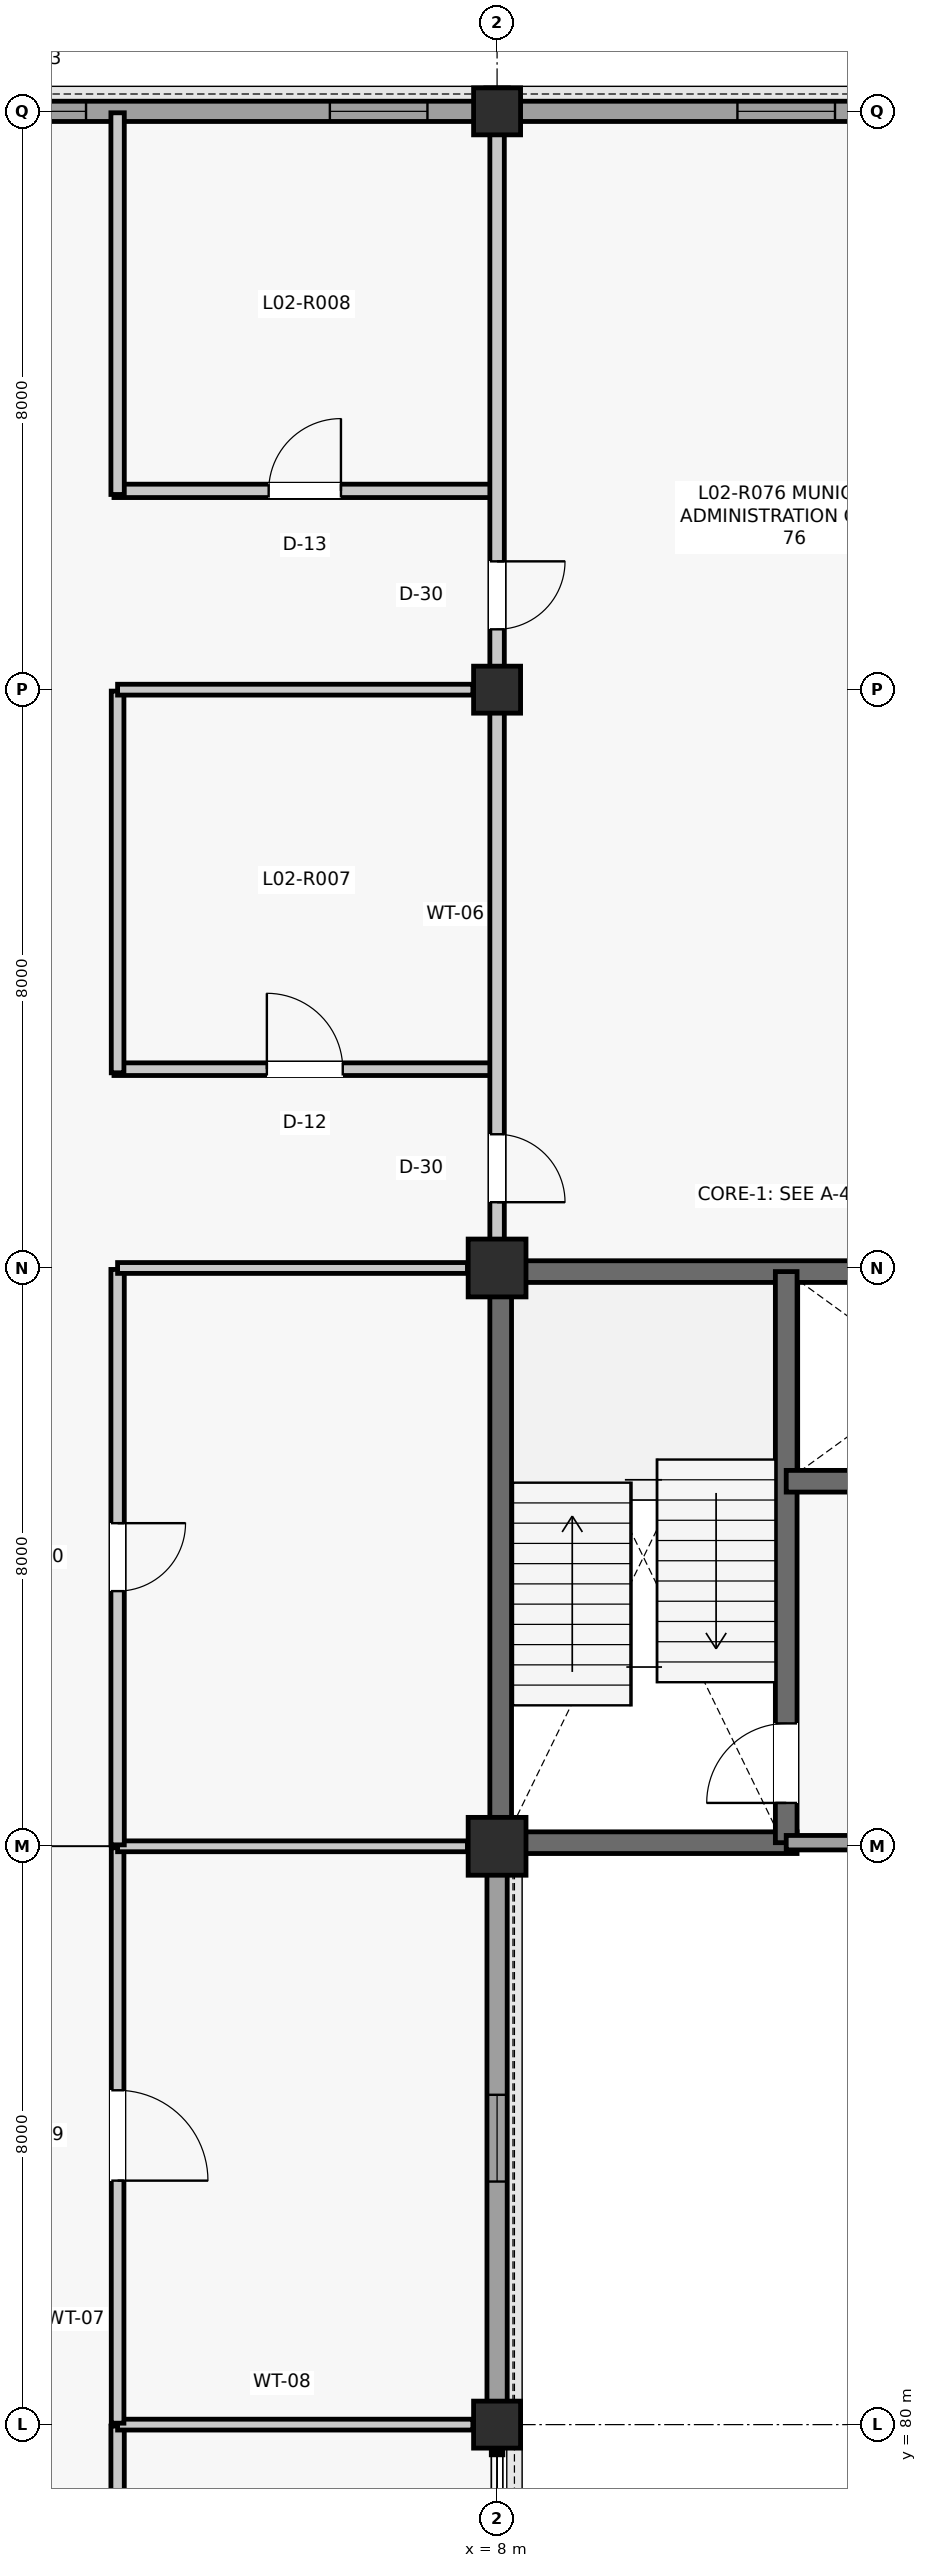
"""IFC4 building model, lengths in metres.
Left out: names, types, materials, properties, quantities, classifications, styles, units other than length and angle.
Written with IfcOpenShell. Run it as: python <this file> out.ifc"""

import sys

from ifc_helpers import new_model, si_unit, direction, frame, frame_2d, origin, origin_2d, place, context, subcontext, project, spatial, rectangle, extrude, element, fill, save


model = new_model("IFC4")
c1 = context("Model", 3, precision=1e-05, world=origin(), true_north=direction((0.0, 1.0)))
c2 = subcontext(c1, "Body", "Model", "MODEL_VIEW")
j1 = project(units=[si_unit("LENGTHUNIT", "METRE"), si_unit("PLANEANGLEUNIT", "RADIAN")], contexts=[c1])
p1 = place(None, origin())
s1 = spatial("IfcSite", under=j1, at=p1, CompositionType="ELEMENT")
p2 = place(p1, origin())
s2 = spatial("IfcBuilding", under=s1, at=p2, CompositionType="ELEMENT")
p3 = place(p2, frame((0.0, 0.0, 9.9)))
s3 = spatial("IfcBuildingStorey", under=s2, at=p3, CompositionType="ELEMENT", Elevation=9.9)
p4 = place(p3, frame((8.0, 80.0, 0.0), z_axis=(0.0, 0.0, 1.0), x_axis=(1.0, 0.0, 0.0)))
e1 = element("IfcColumn", 1, at=p4, inside=s3, PredefinedType="COLUMN", context=c2, shape_type="SweptSolid", body=[
    extrude(rectangle(XDim=0.65, YDim=0.65, at=origin_2d()), origin(), (0.0, 0.0, 1.0), 3.96),
])
for number, where, z_axis, x_axis in (
    (2, (8.0, 88.0, 0.0), (0.0, 0.0, 1.0), (1.0, 0.0, 0.0)),
    (3, (8.0, 96.0, 0.0), (0.0, 0.0, 1.0), (1.0, 0.0, 0.0)),
):
    element("IfcColumn", number, at=place(p3, frame(where, z_axis=z_axis, x_axis=x_axis)), inside=s3, PredefinedType="COLUMN", context=c2, shape_type="SweptSolid", body=[
        extrude(rectangle(XDim=0.8, YDim=0.8, at=origin_2d()), origin(), (0.0, 0.0, 1.0), 3.96),
    ])
for number, where, z_axis, x_axis in (
    (4, (8.0, 104.0, 0.0), (0.0, 0.0, 1.0), (1.0, 0.0, 0.0)),
    (5, (8.0, 112.0, 0.0), (0.0, 0.0, 1.0), (1.0, 0.0, 0.0)),
):
    element("IfcColumn", number, at=place(p3, frame(where, z_axis=z_axis, x_axis=x_axis)), inside=s3, PredefinedType="COLUMN", context=c2, shape_type="SweptSolid", body=[
        extrude(rectangle(XDim=0.65, YDim=0.65, at=origin_2d()), origin(), (0.0, 0.0, 1.0), 3.96),
    ])
p5 = place(p3, frame((8.0, 80.31, 0.0), z_axis=(0.0, 0.0, 1.0), x_axis=(0.0, 1.0, 0.0)))
e6 = element("IfcWall", 6, at=p5, inside=s3, PredefinedType="SOLIDWALL", context=c2, shape_type="SweptSolid", body=[
    extrude(rectangle(XDim=7.305, YDim=0.28, at=frame_2d((3.652, 0.0))), origin(), (0.0, 0.0, 1.0), 3.344),
])
p6 = place(p5, frame((3.052, 0.0, 0.9)))
e7 = element("IfcOpeningElement", 7, at=p6, cuts=e6, PredefinedType="OPENING", context=c2, shape_type="SweptSolid", body=[
    extrude(rectangle(XDim=1.2, YDim=1.8, at=frame_2d((0.6, 0.9))), frame((0.0, 0.15, 0.0), z_axis=(0.0, -1.0, 0.0), x_axis=(1.0, 0.0, 0.0)), (0.0, 0.0, 1.0), 0.3),
])
p7 = place(p3, frame((0.31, 112.0, 0.0), z_axis=(0.0, 0.0, 1.0), x_axis=(1.0, 0.0, 0.0)))
e8 = element("IfcWall", 8, at=p7, inside=s3, PredefinedType="SOLIDWALL", context=c2, shape_type="SweptSolid", body=[
    extrude(rectangle(XDim=7.38, YDim=0.28, at=frame_2d((3.69, 0.0))), origin(), (0.0, 0.0, 1.0), 3.28),
])
p8 = place(p7, frame((0.653, 0.0, 0.95)))
e9 = element("IfcOpeningElement", 9, at=p8, cuts=e8, PredefinedType="OPENING", context=c2, shape_type="SweptSolid", body=[
    extrude(rectangle(XDim=1.35, YDim=1.9, at=frame_2d((0.675, 0.95))), frame((0.0, 0.15, 0.0), z_axis=(0.0, -1.0, 0.0), x_axis=(1.0, 0.0, 0.0)), (0.0, 0.0, 1.0), 0.3),
])
p9 = place(p7, frame((5.377, 0.0, 0.95)))
e10 = element("IfcOpeningElement", 10, at=p9, cuts=e8, PredefinedType="OPENING", context=c2, shape_type="SweptSolid", body=[
    extrude(rectangle(XDim=1.35, YDim=1.9, at=frame_2d((0.675, 0.95))), frame((0.0, 0.15, 0.0), z_axis=(0.0, -1.0, 0.0), x_axis=(1.0, 0.0, 0.0)), (0.0, 0.0, 1.0), 0.3),
])
p10 = place(p3, frame((8.31, 112.0, 0.0), z_axis=(0.0, 0.0, 1.0), x_axis=(1.0, 0.0, 0.0)))
e11 = element("IfcWall", 11, at=p10, inside=s3, PredefinedType="SOLIDWALL", context=c2, shape_type="SweptSolid", body=[
    extrude(rectangle(XDim=7.38, YDim=0.28, at=frame_2d((3.69, 0.0))), origin(), (0.0, 0.0, 1.0), 3.344),
])
p11 = place(p10, frame((3.015, 0.0, 0.9)))
e12 = element("IfcOpeningElement", 12, at=p11, cuts=e11, PredefinedType="OPENING", context=c2, shape_type="SweptSolid", body=[
    extrude(rectangle(XDim=1.35, YDim=1.9, at=frame_2d((0.675, 0.95))), frame((0.0, 0.15, 0.0), z_axis=(0.0, -1.0, 0.0), x_axis=(1.0, 0.0, 0.0)), (0.0, 0.0, 1.0), 0.3),
])
for number, where, z_axis, x_axis in (
    (13, (8.05, 88.29, 0.0), (0.0, 0.0, 1.0), (0.0, 1.0, 0.0)),
    (14, (8.29, 95.95, 0.0), (0.0, 0.0, 1.0), (1.0, 0.0, 0.0)),
):
    element("IfcWall", number, at=place(p3, frame(where, z_axis=z_axis, x_axis=x_axis)), inside=s3, PredefinedType="SHEAR", context=c2, shape_type="SweptSolid", body=[
        extrude(rectangle(XDim=7.42, YDim=0.3, at=frame_2d((3.71, 0.0))), origin(), (0.0, 0.0, 1.0), 3.705),
    ])
p12 = place(p3, frame((8.29, 88.05, 0.0), z_axis=(0.0, 0.0, 1.0), x_axis=(1.0, 0.0, 0.0)))
e15 = element("IfcWall", 15, at=p12, inside=s3, PredefinedType="SHEAR", context=c2, shape_type="SweptSolid", body=[
    extrude(rectangle(XDim=3.86, YDim=0.3, at=frame_2d((1.93, 0.0))), origin(), (0.0, 0.0, 1.0), 3.705),
])
p13 = place(p3, frame((12.0, 88.05, 0.0), z_axis=(0.0, 0.0, 1.0), x_axis=(0.0, 1.0, 0.0)))
e16 = element("IfcWall", 16, at=p13, inside=s3, PredefinedType="SHEAR", context=c2, shape_type="SweptSolid", body=[
    extrude(rectangle(XDim=7.9, YDim=0.3, at=frame_2d((3.95, 0.0))), origin(), (0.0, 0.0, 1.0), 3.705),
])
p14 = place(p13, frame((0.55, 0.0, 0.0)))
e17 = element("IfcOpeningElement", 17, at=p14, cuts=e16, PredefinedType="OPENING", context=c2, shape_type="SweptSolid", body=[
    extrude(rectangle(XDim=1.1, YDim=2.15, at=frame_2d((0.55, 1.075))), frame((0.0, 0.16, 0.0), z_axis=(0.0, -1.0, 0.0), x_axis=(1.0, 0.0, 0.0)), (0.0, 0.0, 1.0), 0.32),
])
p15 = place(p3, frame((12.0, 93.05, 0.0), z_axis=(0.0, 0.0, 1.0), x_axis=(1.0, 0.0, 0.0)))
e18 = element("IfcWall", 18, at=p15, inside=s3, PredefinedType="SHEAR", context=c2, shape_type="SweptSolid", body=[
    extrude(rectangle(XDim=3.95, YDim=0.3, at=frame_2d((1.975, 0.0))), origin(), (0.0, 0.0, 1.0), 3.705),
])
p16 = place(p15, frame((1.375, 0.0, 0.0)))
e19 = element("IfcOpeningElement", 19, at=p16, cuts=e18, PredefinedType="OPENING", context=c2, shape_type="SweptSolid", body=[
    extrude(rectangle(XDim=1.2, YDim=2.2, at=frame_2d((0.6, 1.1))), frame((0.0, 0.16, 0.0), z_axis=(0.0, -1.0, 0.0), x_axis=(1.0, 0.0, 0.0)), (0.0, 0.0, 1.0), 0.32),
])
p17 = place(p3, frame((12.0, 88.05, 0.0), z_axis=(0.0, 0.0, 1.0), x_axis=(1.0, 0.0, 0.0)))
e20 = element("IfcWall", 20, at=p17, inside=s3, PredefinedType="PARTITIONING", context=c2, shape_type="SweptSolid", body=[
    extrude(rectangle(XDim=3.61, YDim=0.2, at=frame_2d((1.805, 0.0))), origin(), (0.0, 0.0, 1.0), 3.277),
])
p18 = place(p3, frame((2.75, 72.02, 0.0), z_axis=(0.0, 0.0, 1.0), x_axis=(0.0, 1.0, 0.0)))
e21 = element("IfcWall", 21, at=p18, inside=s3, PredefinedType="PARTITIONING", context=c2, shape_type="SweptSolid", body=[
    extrude(rectangle(XDim=7.96, YDim=0.185, at=frame_2d((3.98, 0.0))), origin(), (0.0, 0.0, 1.0), 3.141),
])
p19 = place(p18, frame((3.42, 0.0, 0.0)))
e22 = element("IfcOpeningElement", 22, at=p19, cuts=e21, PredefinedType="OPENING", context=c2, shape_type="SweptSolid", body=[
    extrude(rectangle(XDim=1.12, YDim=2.22, at=frame_2d((0.56, 1.11))), frame((0.0, 0.103, 0.0), z_axis=(0.0, -1.0, 0.0), x_axis=(1.0, 0.0, 0.0)), (0.0, 0.0, 1.0), 0.205),
])
p20 = place(p3, frame((2.75, 80.0, 0.0), z_axis=(0.0, 0.0, 1.0), x_axis=(1.0, 0.0, 0.0)))
e23 = element("IfcWall", 23, at=p20, inside=s3, PredefinedType="PARTITIONING", context=c2, shape_type="SweptSolid", body=[
    extrude(rectangle(XDim=4.915, YDim=0.15, at=frame_2d((2.458, 0.0))), origin(), (0.0, 0.0, 1.0), 3.141),
])
p21 = place(p3, frame((2.75, 80.02, 0.0), z_axis=(0.0, 0.0, 1.0), x_axis=(0.0, 1.0, 0.0)))
e24 = element("IfcWall", 24, at=p21, inside=s3, PredefinedType="PARTITIONING", context=c2, shape_type="SweptSolid", body=[
    extrude(rectangle(XDim=7.96, YDim=0.175, at=frame_2d((3.98, 0.0))), origin(), (0.0, 0.0, 1.0), 3.141),
])
p22 = place(p21, frame((3.355, 0.0, 0.0)))
e25 = element("IfcOpeningElement", 25, at=p22, cuts=e24, PredefinedType="OPENING", context=c2, shape_type="SweptSolid", body=[
    extrude(rectangle(XDim=1.25, YDim=2.18, at=frame_2d((0.625, 1.09))), frame((0.0, 0.097, 0.0), z_axis=(0.0, -1.0, 0.0), x_axis=(1.0, 0.0, 0.0)), (0.0, 0.0, 1.0), 0.195),
])
p23 = place(p3, frame((2.75, 88.0, 0.0), z_axis=(0.0, 0.0, 1.0), x_axis=(1.0, 0.0, 0.0)))
e26 = element("IfcWall", 26, at=p23, inside=s3, PredefinedType="PARTITIONING", context=c2, shape_type="SweptSolid", body=[
    extrude(rectangle(XDim=4.84, YDim=0.15, at=frame_2d((2.42, 0.0))), origin(), (0.0, 0.0, 1.0), 3.151),
])
p24 = place(p3, frame((2.75, 88.02, 0.0), z_axis=(0.0, 0.0, 1.0), x_axis=(0.0, 1.0, 0.0)))
e27 = element("IfcWall", 27, at=p24, inside=s3, PredefinedType="PARTITIONING", context=c2, shape_type="SweptSolid", body=[
    extrude(rectangle(XDim=7.96, YDim=0.185, at=frame_2d((3.98, 0.0))), origin(), (0.0, 0.0, 1.0), 3.082),
])
p25 = place(p24, frame((3.51, 0.0, 0.0)))
e28 = element("IfcOpeningElement", 28, at=p25, cuts=e27, PredefinedType="OPENING", context=c2, shape_type="SweptSolid", body=[
    extrude(rectangle(XDim=0.94, YDim=2.12, at=frame_2d((0.47, 1.06))), frame((0.0, 0.103, 0.0), z_axis=(0.0, -1.0, 0.0), x_axis=(1.0, 0.0, 0.0)), (0.0, 0.0, 1.0), 0.205),
])
p26 = place(p3, frame((2.75, 96.0, 0.0), z_axis=(0.0, 0.0, 1.0), x_axis=(1.0, 0.0, 0.0)))
e29 = element("IfcWall", 29, at=p26, inside=s3, PredefinedType="PARTITIONING", context=c2, shape_type="SweptSolid", body=[
    extrude(rectangle(XDim=4.84, YDim=0.15, at=frame_2d((2.42, 0.0))), origin(), (0.0, 0.0, 1.0), 3.082),
])
p27 = place(p3, frame((2.7, 98.75, 0.0), z_axis=(0.0, 0.0, 1.0), x_axis=(1.0, 0.0, 0.0)))
e30 = element("IfcWall", 30, at=p27, inside=s3, PredefinedType="PARTITIONING", context=c2, shape_type="SweptSolid", body=[
    extrude(rectangle(XDim=5.28, YDim=0.175, at=frame_2d((2.64, 0.0))), origin(), (0.0, 0.0, 1.0), 3.227),
])
p28 = place(p27, frame((2.115, 0.0, 0.0)))
e31 = element("IfcOpeningElement", 31, at=p28, cuts=e30, PredefinedType="OPENING", context=c2, shape_type="SweptSolid", body=[
    extrude(rectangle(XDim=1.05, YDim=2.15, at=frame_2d((0.525, 1.075))), frame((0.0, 0.097, 0.0), z_axis=(0.0, -1.0, 0.0), x_axis=(1.0, 0.0, 0.0)), (0.0, 0.0, 1.0), 0.195),
])
p29 = place(p3, frame((2.75, 98.7, 0.0), z_axis=(0.0, 0.0, 1.0), x_axis=(0.0, 1.0, 0.0)))
e32 = element("IfcWall", 32, at=p29, inside=s3, PredefinedType="PARTITIONING", context=c2, shape_type="SweptSolid", body=[
    extrude(rectangle(XDim=5.28, YDim=0.175, at=frame_2d((2.64, 0.0))), origin(), (0.0, 0.0, 1.0), 3.157),
])
p30 = place(p3, frame((2.75, 104.0, 0.0), z_axis=(0.0, 0.0, 1.0), x_axis=(1.0, 0.0, 0.0)))
e33 = element("IfcWall", 33, at=p30, inside=s3, PredefinedType="PARTITIONING", context=c2, shape_type="SweptSolid", body=[
    extrude(rectangle(XDim=4.915, YDim=0.15, at=frame_2d((2.458, 0.0))), origin(), (0.0, 0.0, 1.0), 3.157),
])
p31 = place(p3, frame((2.7, 106.75, 0.0), z_axis=(0.0, 0.0, 1.0), x_axis=(1.0, 0.0, 0.0)))
e34 = element("IfcWall", 34, at=p31, inside=s3, PredefinedType="PARTITIONING", context=c2, shape_type="SweptSolid", body=[
    extrude(rectangle(XDim=5.28, YDim=0.185, at=frame_2d((2.64, 0.0))), origin(), (0.0, 0.0, 1.0), 3.151),
])
p32 = place(p31, frame((2.14, 0.0, 0.0)))
e35 = element("IfcOpeningElement", 35, at=p32, cuts=e34, PredefinedType="OPENING", context=c2, shape_type="SweptSolid", body=[
    extrude(rectangle(XDim=1.0, YDim=2.15, at=frame_2d((0.5, 1.075))), frame((0.0, 0.103, 0.0), z_axis=(0.0, -1.0, 0.0), x_axis=(1.0, 0.0, 0.0)), (0.0, 0.0, 1.0), 0.205),
])
p33 = place(p3, frame((2.75, 106.7, 0.0), z_axis=(0.0, 0.0, 1.0), x_axis=(0.0, 1.0, 0.0)))
e36 = element("IfcWall", 36, at=p33, inside=s3, PredefinedType="PARTITIONING", context=c2, shape_type="SweptSolid", body=[
    extrude(rectangle(XDim=5.28, YDim=0.185, at=frame_2d((2.64, 0.0))), origin(), (0.0, 0.0, 1.0), 3.273),
])
p34 = place(p3, frame((8.0, 96.39, 0.0), z_axis=(0.0, 0.0, 1.0), x_axis=(0.0, 1.0, 0.0)))
e37 = element("IfcWall", 37, at=p34, inside=s3, PredefinedType="PARTITIONING", context=c2, shape_type="SweptSolid", body=[
    extrude(rectangle(XDim=7.295, YDim=0.2, at=frame_2d((3.647, 0.0))), origin(), (0.0, 0.0, 1.0), 3.227),
])
p35 = place(p34, frame((0.52, 0.0, 0.0)))
e38 = element("IfcOpeningElement", 38, at=p35, cuts=e37, PredefinedType="OPENING", context=c2, shape_type="SweptSolid", body=[
    extrude(rectangle(XDim=0.94, YDim=2.12, at=frame_2d((0.47, 1.06))), frame((0.0, 0.11, 0.0), z_axis=(0.0, -1.0, 0.0), x_axis=(1.0, 0.0, 0.0)), (0.0, 0.0, 1.0), 0.22),
])
p36 = place(p3, frame((8.0, 104.315, 0.0), z_axis=(0.0, 0.0, 1.0), x_axis=(0.0, 1.0, 0.0)))
e39 = element("IfcWall", 39, at=p36, inside=s3, PredefinedType="PARTITIONING", context=c2, shape_type="SweptSolid", body=[
    extrude(rectangle(XDim=7.37, YDim=0.2, at=frame_2d((3.685, 0.0))), origin(), (0.0, 0.0, 1.0), 3.151),
])
p37 = place(p36, frame((0.52, 0.0, 0.0)))
e40 = element("IfcOpeningElement", 40, at=p37, cuts=e39, PredefinedType="OPENING", context=c2, shape_type="SweptSolid", body=[
    extrude(rectangle(XDim=0.94, YDim=2.12, at=frame_2d((0.47, 1.06))), frame((0.0, 0.11, 0.0), z_axis=(0.0, -1.0, 0.0), x_axis=(1.0, 0.0, 0.0)), (0.0, 0.0, 1.0), 0.22),
])
p38 = place(p6, origin())
e41 = element("IfcWindow", 41, at=p38, inside=s3, PartitioningType="SINGLE_PANEL", PredefinedType="WINDOW", context=c2, shape_type="SweptSolid", body=[
    extrude(rectangle(XDim=1.2, YDim=1.8, at=frame_2d((0.6, 0.9))), frame((0.0, 0.03, 0.0), z_axis=(0.0, -1.0, 0.0), x_axis=(1.0, 0.0, 0.0)), (0.0, 0.0, 1.0), 0.06),
])
fill(e7, e41)
p39 = place(p8, origin())
e42 = element("IfcWindow", 42, at=p39, inside=s3, PartitioningType="SINGLE_PANEL", PredefinedType="WINDOW", context=c2, shape_type="SweptSolid", body=[
    extrude(rectangle(XDim=1.35, YDim=1.9, at=frame_2d((0.675, 0.95))), frame((0.0, 0.03, 0.0), z_axis=(0.0, -1.0, 0.0), x_axis=(1.0, 0.0, 0.0)), (0.0, 0.0, 1.0), 0.06),
])
fill(e9, e42)
p40 = place(p9, origin())
e43 = element("IfcWindow", 43, at=p40, inside=s3, PartitioningType="SINGLE_PANEL", PredefinedType="WINDOW", context=c2, shape_type="SweptSolid", body=[
    extrude(rectangle(XDim=1.35, YDim=1.9, at=frame_2d((0.675, 0.95))), frame((0.0, 0.03, 0.0), z_axis=(0.0, -1.0, 0.0), x_axis=(1.0, 0.0, 0.0)), (0.0, 0.0, 1.0), 0.06),
])
fill(e10, e43)
p41 = place(p11, origin())
e44 = element("IfcWindow", 44, at=p41, inside=s3, PartitioningType="SINGLE_PANEL", PredefinedType="WINDOW", context=c2, shape_type="SweptSolid", body=[
    extrude(rectangle(XDim=1.35, YDim=1.9, at=frame_2d((0.675, 0.95))), frame((0.0, 0.03, 0.0), z_axis=(0.0, -1.0, 0.0), x_axis=(1.0, 0.0, 0.0)), (0.0, 0.0, 1.0), 0.06),
])
fill(e12, e44)
p42 = place(p14, origin())
e45 = element("IfcDoor", 45, at=p42, inside=s3, OperationType="SINGLE_SWING_LEFT", PredefinedType="DOOR", context=c2, shape_type="SweptSolid", body=[
    extrude(rectangle(XDim=1.1, YDim=2.15, at=frame_2d((0.55, 1.075))), frame((0.0, 0.025, 0.0), z_axis=(0.0, -1.0, 0.0), x_axis=(1.0, 0.0, 0.0)), (0.0, 0.0, 1.0), 0.05),
])
fill(e17, e45)
p43 = place(p22, frame((1.25, 0.0, 0.0), z_axis=(0.0, 0.0, 1.0), x_axis=(-1.0, 0.0, 0.0)))
e46 = element("IfcDoor", 46, at=p43, inside=s3, OperationType="SINGLE_SWING_LEFT", PredefinedType="DOOR", context=c2, shape_type="SweptSolid", body=[
    extrude(rectangle(XDim=1.25, YDim=2.18, at=frame_2d((0.625, 1.09))), frame((0.0, 0.025, 0.0), z_axis=(0.0, -1.0, 0.0), x_axis=(1.0, 0.0, 0.0)), (0.0, 0.0, 1.0), 0.05),
])
fill(e25, e46)
p44 = place(p25, frame((0.94, 0.0, 0.0), z_axis=(0.0, 0.0, 1.0), x_axis=(-1.0, 0.0, 0.0)))
e47 = element("IfcDoor", 47, at=p44, inside=s3, OperationType="SINGLE_SWING_RIGHT", PredefinedType="DOOR", context=c2, shape_type="SweptSolid", body=[
    extrude(rectangle(XDim=0.94, YDim=2.12, at=frame_2d((0.47, 1.06))), frame((0.0, 0.025, 0.0), z_axis=(0.0, -1.0, 0.0), x_axis=(1.0, 0.0, 0.0)), (0.0, 0.0, 1.0), 0.05),
])
fill(e28, e47)
p45 = place(p28, origin())
e48 = element("IfcDoor", 48, at=p45, inside=s3, OperationType="SINGLE_SWING_LEFT", PredefinedType="DOOR", context=c2, shape_type="SweptSolid", body=[
    extrude(rectangle(XDim=1.05, YDim=2.15, at=frame_2d((0.525, 1.075))), frame((0.0, 0.025, 0.0), z_axis=(0.0, -1.0, 0.0), x_axis=(1.0, 0.0, 0.0)), (0.0, 0.0, 1.0), 0.05),
])
fill(e31, e48)
p46 = place(p32, origin())
e49 = element("IfcDoor", 49, at=p46, inside=s3, OperationType="SINGLE_SWING_RIGHT", PredefinedType="DOOR", context=c2, shape_type="SweptSolid", body=[
    extrude(rectangle(XDim=1.0, YDim=2.15, at=frame_2d((0.5, 1.075))), frame((0.0, 0.025, 0.0), z_axis=(0.0, -1.0, 0.0), x_axis=(1.0, 0.0, 0.0)), (0.0, 0.0, 1.0), 0.05),
])
fill(e35, e49)
p47 = place(p35, frame((0.94, 0.0, 0.0), z_axis=(0.0, 0.0, 1.0), x_axis=(-1.0, 0.0, 0.0)))
e50 = element("IfcDoor", 50, at=p47, inside=s3, OperationType="SINGLE_SWING_LEFT", PredefinedType="DOOR", context=c2, shape_type="SweptSolid", body=[
    extrude(rectangle(XDim=0.94, YDim=2.12, at=frame_2d((0.47, 1.06))), frame((0.0, 0.025, 0.0), z_axis=(0.0, -1.0, 0.0), x_axis=(1.0, 0.0, 0.0)), (0.0, 0.0, 1.0), 0.05),
])
fill(e38, e50)
p48 = place(p37, frame((0.94, 0.0, 0.0), z_axis=(0.0, 0.0, 1.0), x_axis=(-1.0, 0.0, 0.0)))
e51 = element("IfcDoor", 51, at=p48, inside=s3, OperationType="SINGLE_SWING_RIGHT", PredefinedType="DOOR", context=c2, shape_type="SweptSolid", body=[
    extrude(rectangle(XDim=0.94, YDim=2.12, at=frame_2d((0.47, 1.06))), frame((0.0, 0.025, 0.0), z_axis=(0.0, -1.0, 0.0), x_axis=(1.0, 0.0, 0.0)), (0.0, 0.0, 1.0), 0.05),
])
fill(e40, e51)
save(model, sys.argv[1])
